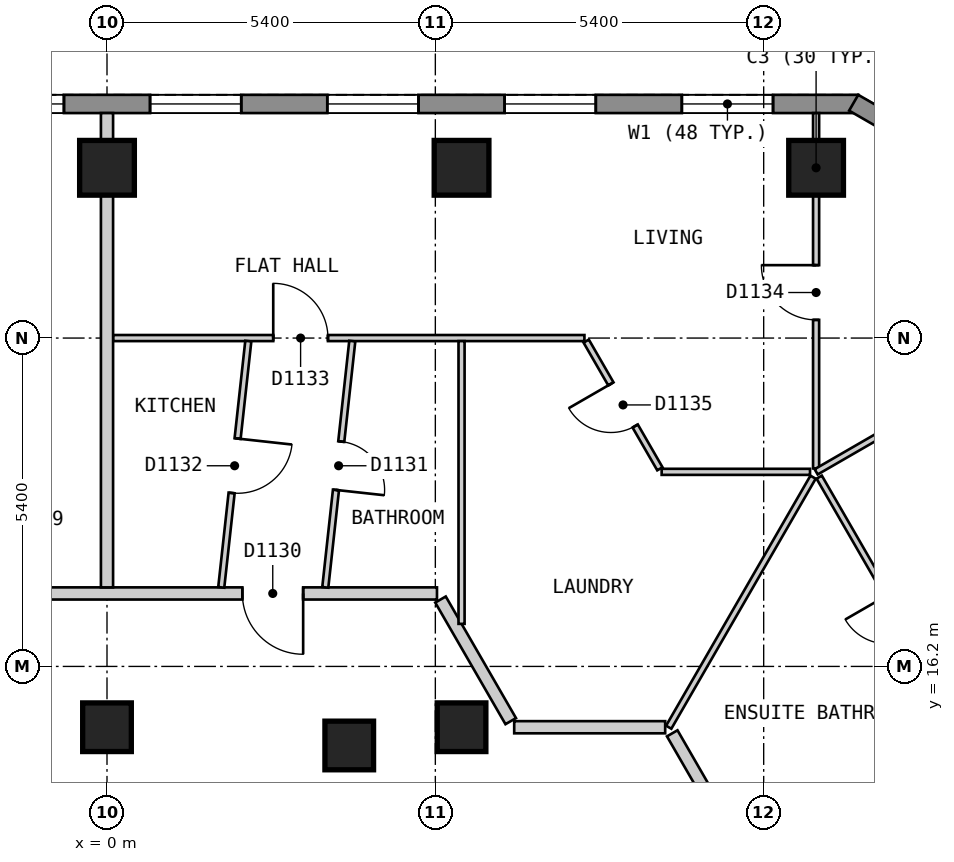
"""IFC4 building model, lengths in metres.
Left out: names, types, materials, properties, quantities, classifications, styles, units other than length and angle.
Written with IfcOpenShell. Run it as: python <this file> out.ifc"""

import sys

from ifc_helpers import new_model, si_unit, direction, frame, frame_2d, origin, origin_2d, place, context, subcontext, project, spatial, polyline, rectangle, outline, extrude, element, fill, save


model = new_model("IFC4")
c1 = context("Model", 3, precision=1e-05, world=origin(), true_north=direction((0.0, 1.0)))
c2 = subcontext(c1, "Body", "Model", "MODEL_VIEW")
j1 = project(units=[si_unit("LENGTHUNIT", "METRE"), si_unit("PLANEANGLEUNIT", "RADIAN")], contexts=[c1])
p1 = place(None, origin())
s1 = spatial("IfcSite", under=j1, at=p1, CompositionType="ELEMENT")
p2 = place(p1, origin())
s2 = spatial("IfcBuilding", under=s1, at=p2, CompositionType="ELEMENT")
p3 = place(p2, frame((0.0, 0.0, 150.6)))
s3 = spatial("IfcBuildingStorey", under=s2, at=p3, CompositionType="ELEMENT", Elevation=150.6)
for number, where, z_axis, x_axis in (
    (1, (11.662, 24.4, 0.0), (0.0, 0.0, 1.0), (-1.0, 0.0, 0.0)),
    (2, (5.831, 24.4, 0.0), (0.0, 0.0, 1.0), (-1.0, 0.0, 0.0)),
    (3, (0.0, 24.4, 0.0), (0.0, 0.0, 1.0), (-1.0, 0.0, 0.0)),
):
    element("IfcColumn", number, at=place(p3, frame(where, z_axis=z_axis, x_axis=x_axis)), inside=s3, PredefinedType="COLUMN", context=c2, shape_type="SweptSolid", body=[
        extrude(rectangle(XDim=0.9, YDim=0.9, at=origin_2d()), origin(), (0.0, 0.0, 1.0), 3.0),
    ])
for number, where, z_axis, x_axis in (
    (4, (5.831, 15.2, 0.0), (0.0, 0.0, 1.0), (-1.0, 0.0, 0.0)),
    (5, (3.984, 14.9, 0.0), (0.0, 0.0, 1.0), (1.0, 0.0, 0.0)),
    (6, (0.0, 15.2, 0.0), (0.0, 0.0, 1.0), (-1.0, 0.0, 0.0)),
):
    element("IfcColumn", number, at=place(p3, frame(where, z_axis=z_axis, x_axis=x_axis)), inside=s3, PredefinedType="COLUMN", context=c2, shape_type="SweptSolid", body=[
        extrude(rectangle(XDim=0.8, YDim=0.8, at=origin_2d()), origin(), (0.0, 0.0, 1.0), 3.0),
    ])
p4 = place(p3, frame((12.355, 25.45, 0.0), z_axis=(0.0, 0.0, 1.0), x_axis=(-1.0, 0.0, 0.0)))
e7 = element("IfcWall", 7, at=p4, inside=s3, PredefinedType="SOLIDWALL", context=c2, shape_type="SweptSolid", body=[
    extrude(outline(polyline([(0.0, -0.15), (24.71, -0.15), (24.63, 0.15), (0.08, 0.15), (0.0, -0.15)])), origin(), (0.0, 0.0, 1.0), 2.6),
])
p5 = place(p4, frame((1.401, 0.0, 0.15)))
e8 = element("IfcOpeningElement", 8, at=p5, cuts=e7, PredefinedType="OPENING", context=c2, shape_type="SweptSolid", body=[
    extrude(rectangle(XDim=1.5, YDim=2.1, at=frame_2d((0.75, 1.05))), frame((0.0, 0.16, 0.0), z_axis=(0.0, -1.0, 0.0), x_axis=(1.0, 0.0, 0.0)), (0.0, 0.0, 1.0), 0.32),
])
p6 = place(p4, frame((4.316, 0.0, 0.15)))
e9 = element("IfcOpeningElement", 9, at=p6, cuts=e7, PredefinedType="OPENING", context=c2, shape_type="SweptSolid", body=[
    extrude(rectangle(XDim=1.5, YDim=2.1, at=frame_2d((0.75, 1.05))), frame((0.0, 0.16, 0.0), z_axis=(0.0, -1.0, 0.0), x_axis=(1.0, 0.0, 0.0)), (0.0, 0.0, 1.0), 0.32),
])
p7 = place(p4, frame((7.232, 0.0, 0.15)))
e10 = element("IfcOpeningElement", 10, at=p7, cuts=e7, PredefinedType="OPENING", context=c2, shape_type="SweptSolid", body=[
    extrude(rectangle(XDim=1.5, YDim=2.1, at=frame_2d((0.75, 1.05))), frame((0.0, 0.16, 0.0), z_axis=(0.0, -1.0, 0.0), x_axis=(1.0, 0.0, 0.0)), (0.0, 0.0, 1.0), 0.32),
])
p8 = place(p4, frame((10.147, 0.0, 0.15)))
e11 = element("IfcOpeningElement", 11, at=p8, cuts=e7, PredefinedType="OPENING", context=c2, shape_type="SweptSolid", body=[
    extrude(rectangle(XDim=1.5, YDim=2.1, at=frame_2d((0.75, 1.05))), frame((0.0, 0.16, 0.0), z_axis=(0.0, -1.0, 0.0), x_axis=(1.0, 0.0, 0.0)), (0.0, 0.0, 1.0), 0.32),
])
p9 = place(p4, frame((13.063, 0.0, 0.15)))
e12 = element("IfcOpeningElement", 12, at=p9, cuts=e7, PredefinedType="OPENING", context=c2, shape_type="SweptSolid", body=[
    extrude(rectangle(XDim=1.5, YDim=2.1, at=frame_2d((0.75, 1.05))), frame((0.0, 0.16, 0.0), z_axis=(0.0, -1.0, 0.0), x_axis=(1.0, 0.0, 0.0)), (0.0, 0.0, 1.0), 0.32),
])
p10 = place(p4, frame((15.978, 0.0, 0.15)))
e13 = element("IfcOpeningElement", 13, at=p10, cuts=e7, PredefinedType="OPENING", context=c2, shape_type="SweptSolid", body=[
    extrude(rectangle(XDim=1.5, YDim=2.1, at=frame_2d((0.75, 1.05))), frame((0.0, 0.16, 0.0), z_axis=(0.0, -1.0, 0.0), x_axis=(1.0, 0.0, 0.0)), (0.0, 0.0, 1.0), 0.32),
])
p11 = place(p4, frame((18.894, 0.0, 0.15)))
e14 = element("IfcOpeningElement", 14, at=p11, cuts=e7, PredefinedType="OPENING", context=c2, shape_type="SweptSolid", body=[
    extrude(rectangle(XDim=1.5, YDim=2.1, at=frame_2d((0.75, 1.05))), frame((0.0, 0.16, 0.0), z_axis=(0.0, -1.0, 0.0), x_axis=(1.0, 0.0, 0.0)), (0.0, 0.0, 1.0), 0.32),
])
p12 = place(p4, frame((21.809, 0.0, 0.15)))
e15 = element("IfcOpeningElement", 15, at=p12, cuts=e7, PredefinedType="OPENING", context=c2, shape_type="SweptSolid", body=[
    extrude(rectangle(XDim=1.5, YDim=2.1, at=frame_2d((0.75, 1.05))), frame((0.0, 0.16, 0.0), z_axis=(0.0, -1.0, 0.0), x_axis=(1.0, 0.0, 0.0)), (0.0, 0.0, 1.0), 0.32),
])
p13 = place(p3, frame((16.61, 22.97, 0.0), z_axis=(0.0, 0.0, 1.0), x_axis=(-0.866022959057, 0.500004234368, 0.0)))
e16 = element("IfcWall", 16, at=p13, inside=s3, PredefinedType="SOLIDWALL", context=c2, shape_type="SweptSolid", body=[
    extrude(outline(polyline([(0.0, -0.15), (5.0, -0.15), (4.92, 0.15), (0.08, 0.15), (0.0, -0.15)])), origin(), (0.0, 0.0, 1.0), 2.6),
])
p14 = place(p13, frame((0.65, 0.0, 0.15)))
e17 = element("IfcOpeningElement", 17, at=p14, cuts=e16, PredefinedType="OPENING", context=c2, shape_type="SweptSolid", body=[
    extrude(rectangle(XDim=1.2, YDim=2.1, at=frame_2d((0.6, 1.05))), frame((0.0, 0.16, 0.0), z_axis=(0.0, -1.0, 0.0), x_axis=(1.0, 0.0, 0.0)), (0.0, 0.0, 1.0), 0.32),
])
p15 = place(p13, frame((3.15, 0.0, 0.15)))
e18 = element("IfcOpeningElement", 18, at=p15, cuts=e16, PredefinedType="OPENING", context=c2, shape_type="SweptSolid", body=[
    extrude(rectangle(XDim=1.2, YDim=2.1, at=frame_2d((0.6, 1.05))), frame((0.0, 0.16, 0.0), z_axis=(0.0, -1.0, 0.0), x_axis=(1.0, 0.0, 0.0)), (0.0, 0.0, 1.0), 0.32),
])
p16 = place(p3, frame((5.485, 17.3, 0.0), z_axis=(0.0, 0.0, 1.0), x_axis=(0.500027479704, -0.866009537788, 0.0)))
e19 = element("IfcWall", 19, at=p16, inside=s3, PredefinedType="PARTITIONING", context=c2, shape_type="SweptSolid", body=[
    extrude(rectangle(XDim=2.309, YDim=0.2, at=frame_2d((1.155, 0.0))), origin(), (0.0, 0.0, 1.0), 2.6),
])
p17 = place(p3, frame((9.296, 15.1, 0.0), z_axis=(0.0, 0.0, 1.0), x_axis=(0.499974024244, -0.866040400375, 0.0)))
e20 = element("IfcWall", 20, at=p17, inside=s3, PredefinedType="PARTITIONING", context=c2, shape_type="SweptSolid", body=[
    extrude(rectangle(XDim=16.857, YDim=0.2, at=frame_2d((8.429, 0.0))), origin(), (0.0, 0.0, 1.0), 2.6),
])
p18 = place(p17, frame((11.522, 0.0, 0.0)))
e21 = element("IfcOpeningElement", 21, at=p18, cuts=e20, PredefinedType="OPENING", context=c2, shape_type="SweptSolid", body=[
    extrude(rectangle(XDim=1.0, YDim=2.1, at=frame_2d((0.5, 1.05))), frame((0.0, 0.11, 0.0), z_axis=(0.0, -1.0, 0.0), x_axis=(1.0, 0.0, 0.0)), (0.0, 0.0, 1.0), 0.22),
])
p19 = place(p3, frame((6.697, 15.2, 0.0), z_axis=(0.0, 0.0, 1.0), x_axis=(1.0, 0.0, 0.0)))
e22 = element("IfcWall", 22, at=p19, inside=s3, PredefinedType="PARTITIONING", context=c2, shape_type="SweptSolid", body=[
    extrude(rectangle(XDim=2.483, YDim=0.2, at=frame_2d((1.241, 0.0))), origin(), (0.0, 0.0, 1.0), 2.6),
])
p20 = place(p3, frame((-5.312, 17.4, 0.0), z_axis=(0.0, 0.0, 1.0), x_axis=(1.0, 0.0, 0.0)))
e23 = element("IfcWall", 23, at=p20, inside=s3, PredefinedType="PARTITIONING", context=c2, shape_type="SweptSolid", body=[
    extrude(rectangle(XDim=10.739, YDim=0.2, at=frame_2d((5.37, 0.0))), origin(), (0.0, 0.0, 1.0), 2.6),
])
p21 = place(p20, frame((7.538, 0.0, 0.0)))
e24 = element("IfcOpeningElement", 24, at=p21, cuts=e23, PredefinedType="OPENING", context=c2, shape_type="SweptSolid", body=[
    extrude(rectangle(XDim=1.0, YDim=2.1, at=frame_2d((0.5, 1.05))), frame((0.0, 0.11, 0.0), z_axis=(0.0, -1.0, 0.0), x_axis=(1.0, 0.0, 0.0)), (0.0, 0.0, 1.0), 0.22),
])
p22 = place(p20, frame((1.864, 0.0, 0.0)))
e25 = element("IfcOpeningElement", 25, at=p22, cuts=e23, PredefinedType="OPENING", context=c2, shape_type="SweptSolid", body=[
    extrude(rectangle(XDim=1.0, YDim=2.1, at=frame_2d((0.5, 1.05))), frame((0.0, 0.11, 0.0), z_axis=(0.0, -1.0, 0.0), x_axis=(1.0, 0.0, 0.0)), (0.0, 0.0, 1.0), 0.22),
])
p23 = place(p3, frame((7.881, 21.55, 0.0), z_axis=(0.0, 0.0, 1.0), x_axis=(0.499821239653, -0.866128586522, 0.0)))
e26 = element("IfcWall", 26, at=p23, inside=s3, PredefinedType="PARTITIONING", context=c2, shape_type="SweptSolid", body=[
    extrude(rectangle(XDim=2.425, YDim=0.1, at=frame_2d((1.212, 0.0))), origin(), (0.0, 0.0, 1.0), 2.6),
])
p24 = place(p23, frame((0.812, 0.0, 0.0)))
e27 = element("IfcOpeningElement", 27, at=p24, cuts=e26, PredefinedType="OPENING", context=c2, shape_type="SweptSolid", body=[
    extrude(rectangle(XDim=0.8, YDim=2.1, at=frame_2d((0.4, 1.05))), frame((0.0, 0.06, 0.0), z_axis=(0.0, -1.0, 0.0), x_axis=(1.0, 0.0, 0.0)), (0.0, 0.0, 1.0), 0.12),
])
p25 = place(p3, frame((11.713, 19.313, 0.0), z_axis=(0.0, 0.0, 1.0), x_axis=(0.499945064984, -0.866057118208, 0.0)))
e28 = element("IfcWall", 28, at=p25, inside=s3, PredefinedType="PARTITIONING", context=c2, shape_type="SweptSolid", body=[
    extrude(rectangle(XDim=5.285, YDim=0.1, at=frame_2d((2.642, 0.0))), origin(), (0.0, 0.0, 1.0), 2.6),
])
p26 = place(p25, frame((2.242, 0.0, 0.0)))
e29 = element("IfcOpeningElement", 29, at=p26, cuts=e28, PredefinedType="OPENING", context=c2, shape_type="SweptSolid", body=[
    extrude(rectangle(XDim=0.8, YDim=2.1, at=frame_2d((0.4, 1.05))), frame((0.0, 0.06, 0.0), z_axis=(0.0, -1.0, 0.0), x_axis=(1.0, 0.0, 0.0)), (0.0, 0.0, 1.0), 0.12),
])
p27 = place(p3, frame((9.122, 19.4, 0.0), z_axis=(0.0, 0.0, 1.0), x_axis=(1.0, 0.0, 0.0)))
e30 = element("IfcWall", 30, at=p27, inside=s3, PredefinedType="PARTITIONING", context=c2, shape_type="SweptSolid", body=[
    extrude(rectangle(XDim=2.44, YDim=0.1, at=frame_2d((1.22, 0.0))), origin(), (0.0, 0.0, 1.0), 2.6),
])
p28 = place(p3, frame((0.1, 21.6, 0.0), z_axis=(0.0, 0.0, 1.0), x_axis=(1.0, 0.0, 0.0)))
e31 = element("IfcWall", 31, at=p28, inside=s3, PredefinedType="PARTITIONING", context=c2, shape_type="SweptSolid", body=[
    extrude(rectangle(XDim=7.752, YDim=0.1, at=frame_2d((3.876, 0.0))), origin(), (0.0, 0.0, 1.0), 2.6),
])
p29 = place(p28, frame((2.634, 0.0, 0.0)))
e32 = element("IfcOpeningElement", 32, at=p29, cuts=e31, PredefinedType="OPENING", context=c2, shape_type="SweptSolid", body=[
    extrude(rectangle(XDim=0.9, YDim=2.1, at=frame_2d((0.45, 1.05))), frame((0.0, 0.06, 0.0), z_axis=(0.0, -1.0, 0.0), x_axis=(1.0, 0.0, 0.0)), (0.0, 0.0, 1.0), 0.12),
])
p30 = place(p3, frame((9.238, 15.2, 0.0), z_axis=(0.0, 0.0, 1.0), x_axis=(0.499988022762, 0.866032318735, 0.0)))
e33 = element("IfcWall", 33, at=p30, inside=s3, PredefinedType="PARTITIONING", context=c2, shape_type="SweptSolid", body=[
    extrude(rectangle(XDim=4.748, YDim=0.1, at=frame_2d((2.374, 0.0))), origin(), (0.0, 0.0, 1.0), 2.6),
])
p31 = place(p3, frame((3.59, 17.5, 0.0), z_axis=(0.0, 0.0, 1.0), x_axis=(0.108938463119, 0.994048495423, 0.0)))
e34 = element("IfcWall", 34, at=p31, inside=s3, PredefinedType="PARTITIONING", context=c2, shape_type="SweptSolid", body=[
    extrude(rectangle(XDim=4.074, YDim=0.1, at=frame_2d((2.037, 0.0))), origin(), (0.0, 0.0, 1.0), 2.6),
])
p32 = place(p31, frame((1.612, 0.0, 0.0)))
e35 = element("IfcOpeningElement", 35, at=p32, cuts=e34, PredefinedType="OPENING", context=c2, shape_type="SweptSolid", body=[
    extrude(rectangle(XDim=0.8, YDim=2.1, at=frame_2d((0.4, 1.05))), frame((0.0, 0.06, 0.0), z_axis=(0.0, -1.0, 0.0), x_axis=(1.0, 0.0, 0.0)), (0.0, 0.0, 1.0), 0.12),
])
p33 = place(p3, frame((1.879, 17.5, 0.0), z_axis=(0.0, 0.0, 1.0), x_axis=(0.10923450369, 0.994016007519, 0.0)))
e36 = element("IfcWall", 36, at=p33, inside=s3, PredefinedType="PARTITIONING", context=c2, shape_type="SweptSolid", body=[
    extrude(rectangle(XDim=4.074, YDim=0.1, at=frame_2d((2.037, 0.0))), origin(), (0.0, 0.0, 1.0), 2.6),
])
p34 = place(p33, frame((1.562, 0.0, 0.0)))
e37 = element("IfcOpeningElement", 37, at=p34, cuts=e36, PredefinedType="OPENING", context=c2, shape_type="SweptSolid", body=[
    extrude(rectangle(XDim=0.9, YDim=2.1, at=frame_2d((0.45, 1.05))), frame((0.0, 0.06, 0.0), z_axis=(0.0, -1.0, 0.0), x_axis=(1.0, 0.0, 0.0)), (0.0, 0.0, 1.0), 0.12),
])
p35 = place(p3, frame((5.831, 16.9, 0.0), z_axis=(0.0, 0.0, 1.0), x_axis=(0.0, 1.0, 0.0)))
e38 = element("IfcWall", 38, at=p35, inside=s3, PredefinedType="PARTITIONING", context=c2, shape_type="SweptSolid", body=[
    extrude(rectangle(XDim=4.65, YDim=0.1, at=frame_2d((2.325, 0.0))), origin(), (0.0, 0.0, 1.0), 2.6),
])
p36 = place(p3, frame((11.662, 19.456, 0.0), z_axis=(0.0, 0.0, 1.0), x_axis=(0.0, 1.0, 0.0)))
e39 = element("IfcWall", 39, at=p36, inside=s3, PredefinedType="PARTITIONING", context=c2, shape_type="SweptSolid", body=[
    extrude(rectangle(XDim=5.844, YDim=0.1, at=frame_2d((2.922, 0.0))), origin(), (0.0, 0.0, 1.0), 2.6),
])
p37 = place(p36, frame((2.443, 0.0, 0.0)))
e40 = element("IfcOpeningElement", 40, at=p37, cuts=e39, PredefinedType="OPENING", context=c2, shape_type="SweptSolid", body=[
    extrude(rectangle(XDim=0.9, YDim=2.1, at=frame_2d((0.45, 1.05))), frame((0.0, 0.06, 0.0), z_axis=(0.0, -1.0, 0.0), x_axis=(1.0, 0.0, 0.0)), (0.0, 0.0, 1.0), 0.12),
])
p38 = place(p3, frame((11.663, 19.4, 0.0), z_axis=(0.0, 0.0, 1.0), x_axis=(0.865941558533, 0.500145196124, 0.0)))
e41 = element("IfcWall", 41, at=p38, inside=s3, PredefinedType="PARTITIONING", context=c2, shape_type="SweptSolid", body=[
    extrude(rectangle(XDim=5.899, YDim=0.1, at=frame_2d((2.949, 0.0))), origin(), (0.0, 0.0, 1.0), 2.6),
])
p39 = place(p38, frame((2.499, 0.0, 0.0)))
e42 = element("IfcOpeningElement", 42, at=p39, cuts=e41, PredefinedType="OPENING", context=c2, shape_type="SweptSolid", body=[
    extrude(rectangle(XDim=0.9, YDim=2.1, at=frame_2d((0.45, 1.05))), frame((0.0, 0.06, 0.0), z_axis=(0.0, -1.0, 0.0), x_axis=(1.0, 0.0, 0.0)), (0.0, 0.0, 1.0), 0.12),
])
p40 = place(p3, frame((0.0, 17.5, 0.0), z_axis=(0.0, 0.0, 1.0), x_axis=(0.0, 1.0, 0.0)))
e43 = element("IfcWall", 43, at=p40, inside=s3, PredefinedType="PARTITIONING", context=c2, shape_type="SweptSolid", body=[
    extrude(rectangle(XDim=7.8, YDim=0.2, at=frame_2d((3.9, 0.0))), origin(), (0.0, 0.0, 1.0), 2.6),
])
p41 = place(p3, frame((10.854, 12.6, 0.0), z_axis=(0.0, 0.0, 1.0), x_axis=(0.866031112038, 0.499990112884, 0.0)))
e44 = element("IfcWall", 44, at=p41, inside=s3, PredefinedType="PARTITIONING", context=c2, shape_type="SweptSolid", body=[
    extrude(rectangle(XDim=3.948, YDim=0.2, at=frame_2d((1.974, 0.0))), origin(), (0.0, 0.0, 1.0), 2.6),
])
p42 = place(p5, origin())
e45 = element("IfcWindow", 45, at=p42, inside=s3, PartitioningType="SINGLE_PANEL", PredefinedType="WINDOW", context=c2, shape_type="SweptSolid", body=[
    extrude(rectangle(XDim=1.5, YDim=2.1, at=frame_2d((0.75, 1.05))), frame((0.0, 0.03, 0.0), z_axis=(0.0, -1.0, 0.0), x_axis=(1.0, 0.0, 0.0)), (0.0, 0.0, 1.0), 0.06),
])
fill(e8, e45)
p43 = place(p6, origin())
e46 = element("IfcWindow", 46, at=p43, inside=s3, PartitioningType="SINGLE_PANEL", PredefinedType="WINDOW", context=c2, shape_type="SweptSolid", body=[
    extrude(rectangle(XDim=1.5, YDim=2.1, at=frame_2d((0.75, 1.05))), frame((0.0, 0.03, 0.0), z_axis=(0.0, -1.0, 0.0), x_axis=(1.0, 0.0, 0.0)), (0.0, 0.0, 1.0), 0.06),
])
fill(e9, e46)
p44 = place(p7, origin())
e47 = element("IfcWindow", 47, at=p44, inside=s3, PartitioningType="SINGLE_PANEL", PredefinedType="WINDOW", context=c2, shape_type="SweptSolid", body=[
    extrude(rectangle(XDim=1.5, YDim=2.1, at=frame_2d((0.75, 1.05))), frame((0.0, 0.03, 0.0), z_axis=(0.0, -1.0, 0.0), x_axis=(1.0, 0.0, 0.0)), (0.0, 0.0, 1.0), 0.06),
])
fill(e10, e47)
p45 = place(p8, origin())
e48 = element("IfcWindow", 48, at=p45, inside=s3, PartitioningType="SINGLE_PANEL", PredefinedType="WINDOW", context=c2, shape_type="SweptSolid", body=[
    extrude(rectangle(XDim=1.5, YDim=2.1, at=frame_2d((0.75, 1.05))), frame((0.0, 0.03, 0.0), z_axis=(0.0, -1.0, 0.0), x_axis=(1.0, 0.0, 0.0)), (0.0, 0.0, 1.0), 0.06),
])
fill(e11, e48)
p46 = place(p9, origin())
e49 = element("IfcWindow", 49, at=p46, inside=s3, PartitioningType="SINGLE_PANEL", PredefinedType="WINDOW", context=c2, shape_type="SweptSolid", body=[
    extrude(rectangle(XDim=1.5, YDim=2.1, at=frame_2d((0.75, 1.05))), frame((0.0, 0.03, 0.0), z_axis=(0.0, -1.0, 0.0), x_axis=(1.0, 0.0, 0.0)), (0.0, 0.0, 1.0), 0.06),
])
fill(e12, e49)
p47 = place(p21, origin())
e50 = element("IfcDoor", 50, at=p47, inside=s3, OperationType="SINGLE_SWING_RIGHT", PredefinedType="DOOR", context=c2, shape_type="SweptSolid", body=[
    extrude(rectangle(XDim=1.0, YDim=2.1, at=frame_2d((0.5, 1.05))), frame((0.0, 0.025, 0.0), z_axis=(0.0, -1.0, 0.0), x_axis=(1.0, 0.0, 0.0)), (0.0, 0.0, 1.0), 0.05),
])
fill(e24, e50)
p48 = place(p32, origin())
e51 = element("IfcDoor", 51, at=p48, inside=s3, OperationType="SINGLE_SWING_LEFT", PredefinedType="DOOR", context=c2, shape_type="SweptSolid", body=[
    extrude(rectangle(XDim=0.8, YDim=2.1, at=frame_2d((0.4, 1.05))), frame((0.0, 0.025, 0.0), z_axis=(0.0, -1.0, 0.0), x_axis=(1.0, 0.0, 0.0)), (0.0, 0.0, 1.0), 0.05),
])
fill(e35, e51)
p49 = place(p34, origin())
e52 = element("IfcDoor", 52, at=p49, inside=s3, OperationType="SINGLE_SWING_RIGHT", PredefinedType="DOOR", context=c2, shape_type="SweptSolid", body=[
    extrude(rectangle(XDim=0.9, YDim=2.1, at=frame_2d((0.45, 1.05))), frame((0.0, 0.025, 0.0), z_axis=(0.0, -1.0, 0.0), x_axis=(1.0, 0.0, 0.0)), (0.0, 0.0, 1.0), 0.05),
])
fill(e37, e52)
p50 = place(p29, origin())
e53 = element("IfcDoor", 53, at=p50, inside=s3, OperationType="SINGLE_SWING_LEFT", PredefinedType="DOOR", context=c2, shape_type="SweptSolid", body=[
    extrude(rectangle(XDim=0.9, YDim=2.1, at=frame_2d((0.45, 1.05))), frame((0.0, 0.025, 0.0), z_axis=(0.0, -1.0, 0.0), x_axis=(1.0, 0.0, 0.0)), (0.0, 0.0, 1.0), 0.05),
])
fill(e32, e53)
p51 = place(p37, origin())
e54 = element("IfcDoor", 54, at=p51, inside=s3, OperationType="SINGLE_SWING_RIGHT", PredefinedType="DOOR", context=c2, shape_type="SweptSolid", body=[
    extrude(rectangle(XDim=0.9, YDim=2.1, at=frame_2d((0.45, 1.05))), frame((0.0, 0.025, 0.0), z_axis=(0.0, -1.0, 0.0), x_axis=(1.0, 0.0, 0.0)), (0.0, 0.0, 1.0), 0.05),
])
fill(e40, e54)
p52 = place(p24, origin())
e55 = element("IfcDoor", 55, at=p52, inside=s3, OperationType="SINGLE_SWING_LEFT", PredefinedType="DOOR", context=c2, shape_type="SweptSolid", body=[
    extrude(rectangle(XDim=0.8, YDim=2.1, at=frame_2d((0.4, 1.05))), frame((0.0, 0.025, 0.0), z_axis=(0.0, -1.0, 0.0), x_axis=(1.0, 0.0, 0.0)), (0.0, 0.0, 1.0), 0.05),
])
fill(e27, e55)
save(model, sys.argv[1])
